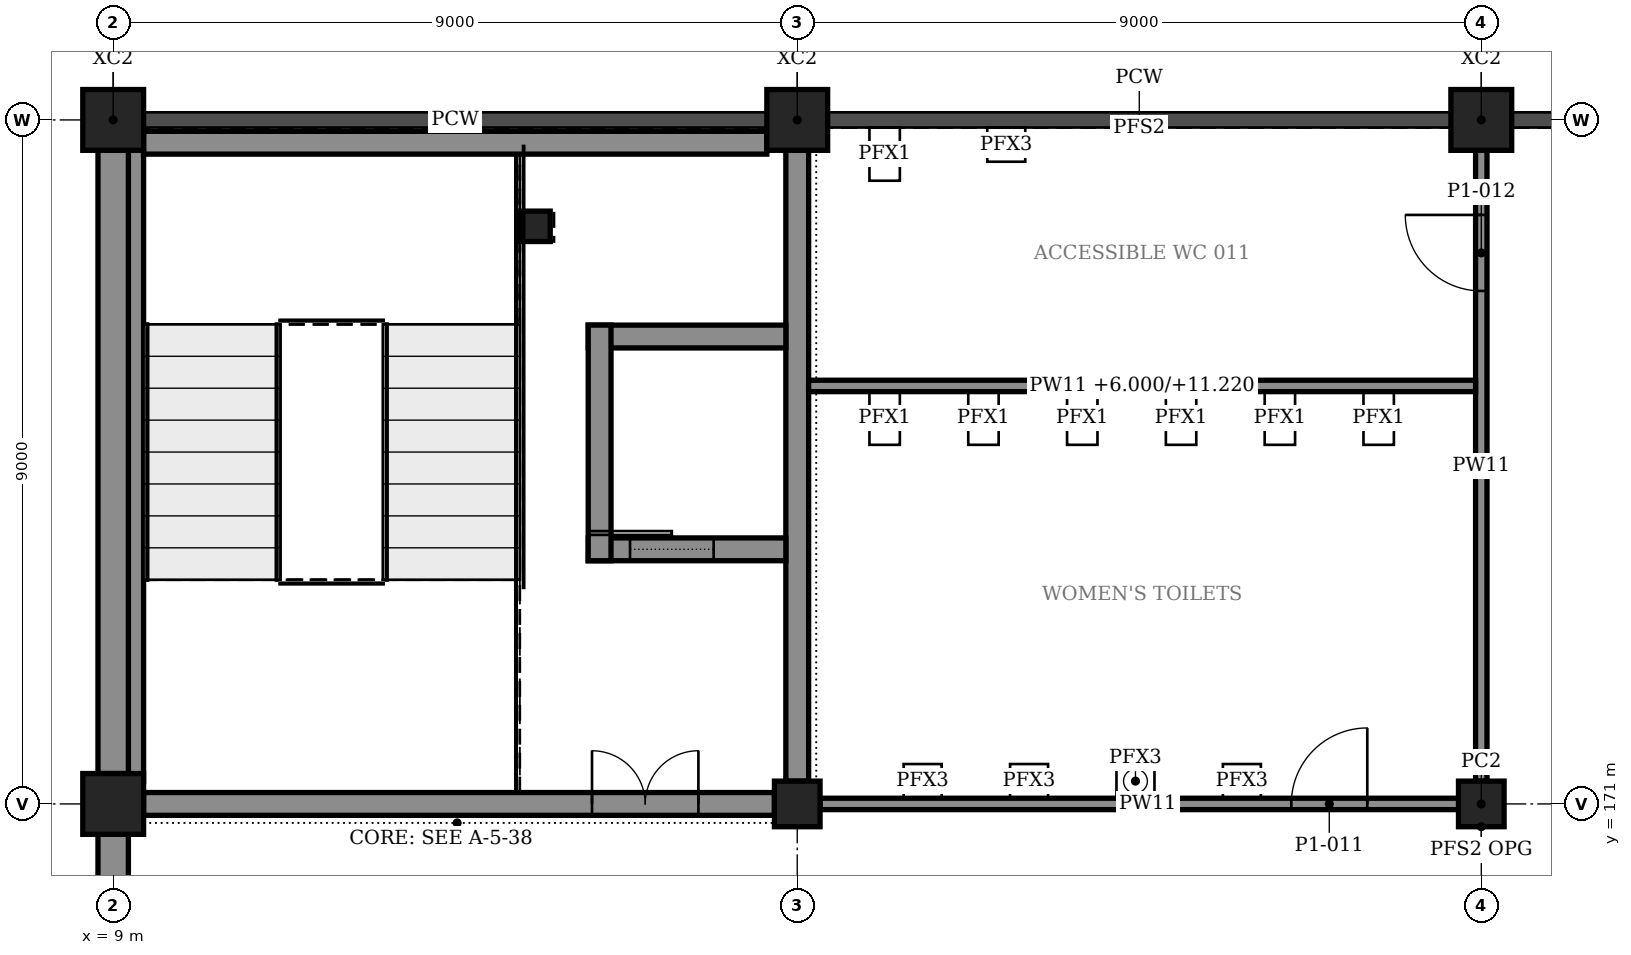
"""IFC4 building model, lengths in metres.
Left out: names, types, materials, properties, quantities, classifications, styles, units other than length and angle.
Written with IfcOpenShell. Run it as: python <this file> out.ifc"""

import sys

from ifc_helpers import new_model, si_unit, direction, frame, frame_2d, origin, origin_2d, place, context, subcontext, project, spatial, rectangle, extrude, element, fill, save


model = new_model("IFC4")
c1 = context("Model", 3, precision=1e-05, world=origin(), true_north=direction((0.0, 1.0)))
c2 = subcontext(c1, "Body", "Model", "MODEL_VIEW")
j1 = project(units=[si_unit("LENGTHUNIT", "METRE"), si_unit("PLANEANGLEUNIT", "RADIAN")], contexts=[c1])
p1 = place(None, origin())
s1 = spatial("IfcSite", under=j1, at=p1, CompositionType="ELEMENT")
p2 = place(p1, origin())
s2 = spatial("IfcBuilding", under=s1, at=p2, CompositionType="ELEMENT")
p3 = place(p2, frame((0.0, 0.0, 6.0)))
s3 = spatial("IfcBuildingStorey", under=s2, at=p3, CompositionType="ELEMENT", Elevation=6.0)
p4 = place(p3, frame((9.0, 171.0, 0.0), z_axis=(0.0, 0.0, 1.0), x_axis=(1.0, 0.0, 0.0)))
e1 = element("IfcColumn", 1, at=p4, inside=s3, PredefinedType="COLUMN", context=c2, shape_type="SweptSolid", body=[
    extrude(rectangle(XDim=0.8, YDim=0.8, at=origin_2d()), origin(), (0.0, 0.0, 1.0), 5.5),
])
for number, where, z_axis, x_axis in (
    (2, (18.0, 171.0, 0.0), (0.0, 0.0, 1.0), (1.0, 0.0, 0.0)),
    (3, (27.0, 171.0, 0.0), (0.0, 0.0, 1.0), (1.0, 0.0, 0.0)),
):
    element("IfcColumn", number, at=place(p3, frame(where, z_axis=z_axis, x_axis=x_axis)), inside=s3, PredefinedType="COLUMN", context=c2, shape_type="SweptSolid", body=[
        extrude(rectangle(XDim=0.6, YDim=0.6, at=origin_2d()), origin(), (0.0, 0.0, 1.0), 5.5),
    ])
for number, where, z_axis, x_axis in (
    (4, (9.0, 180.0, 0.0), (0.0, 0.0, 1.0), (1.0, 0.0, 0.0)),
    (5, (18.0, 180.0, 0.0), (0.0, 0.0, 1.0), (1.0, 0.0, 0.0)),
    (6, (27.0, 180.0, 0.0), (0.0, 0.0, 1.0), (1.0, 0.0, 0.0)),
):
    element("IfcColumn", number, at=place(p3, frame(where, z_axis=z_axis, x_axis=x_axis)), inside=s3, PredefinedType="COLUMN", context=c2, shape_type="SweptSolid", body=[
        extrude(rectangle(XDim=0.8, YDim=0.8, at=origin_2d()), origin(), (0.0, 0.0, 1.0), 5.5),
    ])
p5 = place(p3, frame((14.55, 178.6, 0.0), z_axis=(0.0, 0.0, 1.0), x_axis=(1.0, 0.0, 0.0)))
e7 = element("IfcColumn", 7, at=p5, inside=s3, PredefinedType="COLUMN", context=c2, shape_type="SweptSolid", body=[
    extrude(rectangle(XDim=0.4, YDim=0.4, at=origin_2d()), origin(), (0.0, 0.0, 1.0), 4.0),
])
for number, where, z_axis, x_axis in (
    (8, (9.0, 162.4, 0.0), (0.0, 0.0, 1.0), (0.0, 1.0, 0.0)),
    (9, (9.0, 171.4, 0.0), (0.0, 0.0, 1.0), (0.0, 1.0, 0.0)),
):
    element("IfcWall", number, at=place(p3, frame(where, z_axis=z_axis, x_axis=x_axis)), inside=s3, PredefinedType="SOLIDWALL", context=c2, shape_type="SweptSolid", body=[
        extrude(rectangle(XDim=8.2, YDim=0.4, at=frame_2d((4.1, 0.0))), origin(), (0.0, 0.0, 1.0), 5.5),
    ])
p6 = place(p3, frame((18.0, 171.3, 0.0), z_axis=(0.0, 0.0, 1.0), x_axis=(0.0, 1.0, 0.0)))
e10 = element("IfcWall", 10, at=p6, inside=s3, PredefinedType="SOLIDWALL", context=c2, shape_type="SweptSolid", body=[
    extrude(rectangle(XDim=8.3, YDim=0.3, at=frame_2d((4.15, 0.0))), origin(), (0.0, 0.0, 1.0), 4.32),
])
p7 = place(p3, frame((9.4, 171.0, 0.0), z_axis=(0.0, 0.0, 1.0), x_axis=(1.0, 0.0, 0.0)))
e11 = element("IfcWall", 11, at=p7, inside=s3, PredefinedType="SOLIDWALL", context=c2, shape_type="SweptSolid", body=[
    extrude(rectangle(XDim=8.3, YDim=0.3, at=frame_2d((4.15, 0.0))), origin(), (0.0, 0.0, 1.0), 4.32),
])
p8 = place(p7, frame((5.9, 0.0, 0.0)))
e12 = element("IfcOpeningElement", 12, at=p8, cuts=e11, PredefinedType="OPENING", context=c2, shape_type="SweptSolid", body=[
    extrude(rectangle(XDim=1.4, YDim=2.4, at=frame_2d((0.7, 1.2))), frame((0.0, 0.16, 0.0), z_axis=(0.0, -1.0, 0.0), x_axis=(1.0, 0.0, 0.0)), (0.0, 0.0, 1.0), 0.32),
])
p9 = place(p3, frame((9.3, 171.3, 0.0), z_axis=(0.0, 0.0, 1.0), x_axis=(0.0, 1.0, 0.0)))
e13 = element("IfcWall", 13, at=p9, inside=s3, PredefinedType="SOLIDWALL", context=c2, shape_type="SweptSolid", body=[
    extrude(rectangle(XDim=8.3, YDim=0.2, at=frame_2d((4.15, 0.0))), origin(), (0.0, 0.0, 1.0), 5.22),
])
p10 = place(p3, frame((9.4, 179.7, 0.0), z_axis=(0.0, 0.0, 1.0), x_axis=(1.0, 0.0, 0.0)))
e14 = element("IfcWall", 14, at=p10, inside=s3, PredefinedType="SOLIDWALL", context=c2, shape_type="SweptSolid", body=[
    extrude(rectangle(XDim=8.2, YDim=0.3, at=frame_2d((4.1, 0.0))), origin(), (0.0, 0.0, 1.0), 4.32),
])
p11 = place(p3, frame((27.0, 171.3, 0.0), z_axis=(0.0, 0.0, 1.0), x_axis=(0.0, 1.0, 0.0)))
e15 = element("IfcWall", 15, at=p11, inside=s3, PredefinedType="PARTITIONING", context=c2, shape_type="SweptSolid", body=[
    extrude(rectangle(XDim=8.3, YDim=0.15, at=frame_2d((4.15, 0.0))), origin(), (0.0, 0.0, 1.0), 4.32),
])
p12 = place(p11, frame((6.45, 0.0, 0.0)))
e16 = element("IfcOpeningElement", 16, at=p12, cuts=e15, PredefinedType="OPENING", context=c2, shape_type="SweptSolid", body=[
    extrude(rectangle(XDim=1.0, YDim=2.4, at=frame_2d((0.5, 1.2))), frame((0.0, 0.085, 0.0), z_axis=(0.0, -1.0, 0.0), x_axis=(1.0, 0.0, 0.0)), (0.0, 0.0, 1.0), 0.17),
])
p13 = place(p3, frame((18.3, 171.0, 0.0), z_axis=(0.0, 0.0, 1.0), x_axis=(1.0, 0.0, 0.0)))
e17 = element("IfcWall", 17, at=p13, inside=s3, PredefinedType="PARTITIONING", context=c2, shape_type="SweptSolid", body=[
    extrude(rectangle(XDim=8.625, YDim=0.15, at=frame_2d((4.312, 0.0))), origin(), (0.0, 0.0, 1.0), 4.32),
])
p14 = place(p13, frame((6.2, 0.0, 0.0)))
e18 = element("IfcOpeningElement", 18, at=p14, cuts=e17, PredefinedType="OPENING", context=c2, shape_type="SweptSolid", body=[
    extrude(rectangle(XDim=1.0, YDim=2.4, at=frame_2d((0.5, 1.2))), frame((0.0, 0.085, 0.0), z_axis=(0.0, -1.0, 0.0), x_axis=(1.0, 0.0, 0.0)), (0.0, 0.0, 1.0), 0.17),
])
p15 = place(p3, frame((18.15, 176.5, 0.0), z_axis=(0.0, 0.0, 1.0), x_axis=(1.0, 0.0, 0.0)))
e19 = element("IfcWall", 19, at=p15, inside=s3, PredefinedType="PARTITIONING", context=c2, shape_type="SweptSolid", body=[
    extrude(rectangle(XDim=8.775, YDim=0.15, at=frame_2d((4.388, 0.0))), origin(), (0.0, 0.0, 1.0), 5.22),
])
p16 = place(p3, frame((15.4, 174.2, 0.0), z_axis=(0.0, 0.0, 1.0), x_axis=(0.0, 1.0, 0.0)))
e20 = element("IfcWall", 20, at=p16, inside=s3, PredefinedType="SOLIDWALL", context=c2, shape_type="SweptSolid", body=[
    extrude(rectangle(XDim=3.1, YDim=0.3, at=frame_2d((1.55, 0.0))), origin(), (0.0, 0.0, 1.0), 5.22),
])
p17 = place(p3, frame((15.25, 174.35, 0.0), z_axis=(0.0, 0.0, 1.0), x_axis=(1.0, 0.0, 0.0)))
e21 = element("IfcWall", 21, at=p17, inside=s3, PredefinedType="SOLIDWALL", context=c2, shape_type="SweptSolid", body=[
    extrude(rectangle(XDim=2.6, YDim=0.3, at=frame_2d((1.3, 0.0))), origin(), (0.0, 0.0, 1.0), 5.22),
])
p18 = place(p17, frame((0.55, 0.0, 0.0)))
e22 = element("IfcOpeningElement", 22, at=p18, cuts=e21, PredefinedType="OPENING", context=c2, shape_type="SweptSolid", body=[
    extrude(rectangle(XDim=1.1, YDim=2.1, at=frame_2d((0.55, 1.05))), frame((0.0, 0.16, 0.0), z_axis=(0.0, -1.0, 0.0), x_axis=(1.0, 0.0, 0.0)), (0.0, 0.0, 1.0), 0.32),
])
p19 = place(p3, frame((15.25, 177.15, 0.0), z_axis=(0.0, 0.0, 1.0), x_axis=(1.0, 0.0, 0.0)))
e23 = element("IfcWall", 23, at=p19, inside=s3, PredefinedType="SOLIDWALL", context=c2, shape_type="SweptSolid", body=[
    extrude(rectangle(XDim=2.6, YDim=0.3, at=frame_2d((1.3, 0.0))), origin(), (0.0, 0.0, 1.0), 5.22),
])
p20 = place(p8, origin())
e24 = element("IfcDoor", 24, at=p20, inside=s3, OperationType="SINGLE_SWING_LEFT", PredefinedType="DOOR", context=c2, shape_type="SweptSolid", body=[
    extrude(rectangle(XDim=1.4, YDim=2.4, at=frame_2d((0.7, 1.2))), frame((0.0, 0.025, 0.0), z_axis=(0.0, -1.0, 0.0), x_axis=(1.0, 0.0, 0.0)), (0.0, 0.0, 1.0), 0.05),
])
fill(e12, e24)
p21 = place(p14, origin())
e25 = element("IfcDoor", 25, at=p21, inside=s3, OperationType="SINGLE_SWING_RIGHT", PredefinedType="DOOR", context=c2, shape_type="SweptSolid", body=[
    extrude(rectangle(XDim=1.0, YDim=2.4, at=frame_2d((0.5, 1.2))), frame((0.0, 0.025, 0.0), z_axis=(0.0, -1.0, 0.0), x_axis=(1.0, 0.0, 0.0)), (0.0, 0.0, 1.0), 0.05),
])
fill(e18, e25)
p22 = place(p12, origin())
e26 = element("IfcDoor", 26, at=p22, inside=s3, OperationType="SINGLE_SWING_RIGHT", PredefinedType="DOOR", context=c2, shape_type="SweptSolid", body=[
    extrude(rectangle(XDim=1.0, YDim=2.4, at=frame_2d((0.5, 1.2))), frame((0.0, 0.025, 0.0), z_axis=(0.0, -1.0, 0.0), x_axis=(1.0, 0.0, 0.0)), (0.0, 0.0, 1.0), 0.05),
])
fill(e16, e26)
p23 = place(p18, origin())
e27 = element("IfcDoor", 27, at=p23, inside=s3, OperationType="SLIDING_TO_LEFT", PredefinedType="DOOR", context=c2, shape_type="SweptSolid", body=[
    extrude(rectangle(XDim=1.1, YDim=2.1, at=frame_2d((0.55, 1.05))), frame((0.0, 0.025, 0.0), z_axis=(0.0, -1.0, 0.0), x_axis=(1.0, 0.0, 0.0)), (0.0, 0.0, 1.0), 0.05),
])
fill(e22, e27)
save(model, sys.argv[1])
